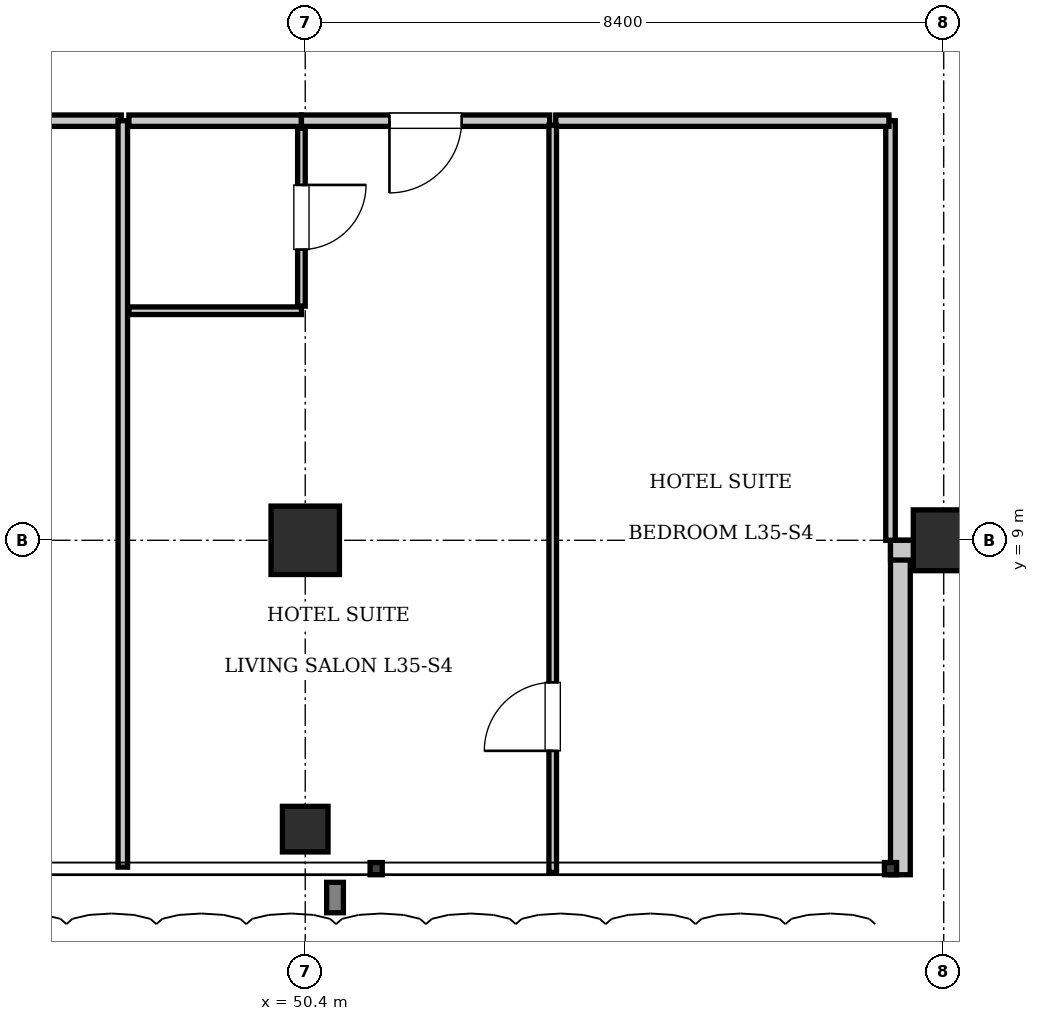
"""IFC4 building model, lengths in metres.
Left out: names, types, materials, properties, quantities, classifications, styles, units other than length and angle.
Written with IfcOpenShell. Run it as: python <this file> out.ifc"""

import sys

from ifc_helpers import new_model, si_unit, direction, frame, frame_2d, origin, origin_2d, place, context, subcontext, project, spatial, rectangle, i_section, extrude, element, fill, save


model = new_model("IFC4")
c1 = context("Model", 3, precision=1e-05, world=origin(), true_north=direction((0.0, 1.0)))
c2 = subcontext(c1, "Body", "Model", "MODEL_VIEW")
j1 = project(units=[si_unit("LENGTHUNIT", "METRE"), si_unit("PLANEANGLEUNIT", "RADIAN")], contexts=[c1])
p1 = place(None, origin())
s1 = spatial("IfcSite", under=j1, at=p1, CompositionType="ELEMENT")
p2 = place(p1, origin())
s2 = spatial("IfcBuilding", under=s1, at=p2, CompositionType="ELEMENT")
p3 = place(p2, frame((0.0, 0.0, 146.65)))
s3 = spatial("IfcBuildingStorey", under=s2, at=p3, CompositionType="ELEMENT", Elevation=146.65)
p4 = place(p3, frame((50.4, 9.0, 0.0), z_axis=(0.0, 0.0, 1.0), x_axis=(1.0, 0.0, 0.0)))
e1 = element("IfcColumn", 1, at=p4, inside=s3, PredefinedType="COLUMN", context=c2, shape_type="SweptSolid", body=[
    extrude(rectangle(XDim=0.9, YDim=0.9, at=origin_2d()), origin(), (0.0, 0.0, 1.0), 3.85),
])
p5 = place(p3, frame((58.8, 9.0, 0.0), z_axis=(0.0, 0.0, 1.0), x_axis=(1.0, 0.0, 0.0)))
e2 = element("IfcColumn", 2, at=p5, inside=s3, PredefinedType="COLUMN", context=c2, shape_type="SweptSolid", body=[
    extrude(rectangle(XDim=0.8, YDim=0.8, at=origin_2d()), origin(), (0.0, 0.0, 1.0), 3.85),
])
p6 = place(p3, frame((50.4, 5.2, 0.0), z_axis=(0.0, 0.0, 1.0), x_axis=(1.0, 0.0, 0.0)))
e3 = element("IfcColumn", 3, at=p6, inside=s3, PredefinedType="COLUMN", context=c2, shape_type="SweptSolid", body=[
    extrude(i_section(OverallWidth=0.6, OverallDepth=0.6, WebThickness=0.025, FlangeThickness=0.038, at=origin_2d()), origin(), (0.0, 0.0, 1.0), 3.85),
])
p7 = place(p3, frame((58.23, 9.0, 0.0), z_axis=(0.0, 0.0, 1.0), x_axis=(0.0, -1.0, 0.0)))
e4 = element("IfcWall", 4, at=p7, inside=s3, PredefinedType="SOLIDWALL", context=c2, shape_type="SweptSolid", body=[
    extrude(rectangle(XDim=4.4, YDim=0.26, at=frame_2d((2.2, 0.0))), origin(), (0.0, 0.0, 1.0), 3.61),
])
p8 = place(p3, frame((62.5, 8.87, 0.0), z_axis=(0.0, 0.0, 1.0), x_axis=(-1.0, 0.0, 0.0)))
e5 = element("IfcWall", 5, at=p8, inside=s3, PredefinedType="SOLIDWALL", context=c2, shape_type="SweptSolid", body=[
    extrude(rectangle(XDim=4.4, YDim=0.26, at=frame_2d((2.2, 0.0))), origin(), (0.0, 0.0, 1.0), 2.998),
])
p9 = place(p3, frame((58.1, 9.0, 0.0), z_axis=(0.0, 0.0, 1.0), x_axis=(0.0, 1.0, 0.0)))
e6 = element("IfcWall", 6, at=p9, inside=s3, PredefinedType="PARTITIONING", context=c2, shape_type="SweptSolid", body=[
    extrude(rectangle(XDim=5.52, YDim=0.125, at=frame_2d((2.76, 0.0))), origin(), (0.0, 0.0, 1.0), 3.61),
])
p10 = place(p3, frame((43.552, 14.52, 0.0), z_axis=(0.0, 0.0, 1.0), x_axis=(1.0, 0.0, 0.0)))
e7 = element("IfcWall", 7, at=p10, inside=s3, PredefinedType="PARTITIONING", context=c2, shape_type="SweptSolid", body=[
    extrude(rectangle(XDim=4.428, YDim=0.15, at=frame_2d((2.214, 0.0))), origin(), (0.0, 0.0, 1.0), 3.61),
])
p11 = place(p3, frame((48.0, 4.7, 0.0), z_axis=(0.0, 0.0, 1.0), x_axis=(0.0, 1.0, 0.0)))
e8 = element("IfcWall", 8, at=p11, inside=s3, PredefinedType="PARTITIONING", context=c2, shape_type="SweptSolid", body=[
    extrude(rectangle(XDim=9.82, YDim=0.125, at=frame_2d((4.91, 0.0))), origin(), (0.0, 0.0, 1.0), 3.61),
])
p12 = place(p3, frame((48.08, 14.52, 0.0), z_axis=(0.0, 0.0, 1.0), x_axis=(1.0, 0.0, 0.0)))
e9 = element("IfcWall", 9, at=p12, inside=s3, PredefinedType="PARTITIONING", context=c2, shape_type="SweptSolid", body=[
    extrude(rectangle(XDim=2.27, YDim=0.15, at=frame_2d((1.135, 0.0))), origin(), (0.0, 0.0, 1.0), 3.61),
])
p13 = place(p3, frame((48.08, 12.02, 0.0), z_axis=(0.0, 0.0, 1.0), x_axis=(1.0, 0.0, 0.0)))
e10 = element("IfcWall", 10, at=p13, inside=s3, PredefinedType="PARTITIONING", context=c2, shape_type="SweptSolid", body=[
    extrude(rectangle(XDim=2.27, YDim=0.1, at=frame_2d((1.135, 0.0))), origin(), (0.0, 0.0, 1.0), 3.61),
])
p14 = place(p3, frame((50.35, 12.08, 0.0), z_axis=(0.0, 0.0, 1.0), x_axis=(0.0, 1.0, 0.0)))
e11 = element("IfcWall", 11, at=p14, inside=s3, PredefinedType="PARTITIONING", context=c2, shape_type="SweptSolid", body=[
    extrude(rectangle(XDim=2.34, YDim=0.1, at=frame_2d((1.17, 0.0))), origin(), (0.0, 0.0, 1.0), 2.998),
])
p15 = place(p14, frame((0.745, 0.0, 0.0)))
e12 = element("IfcOpeningElement", 12, at=p15, cuts=e11, PredefinedType="OPENING", context=c2, shape_type="SweptSolid", body=[
    extrude(rectangle(XDim=0.85, YDim=2.1, at=frame_2d((0.425, 1.05))), frame((0.0, 0.06, 0.0), z_axis=(0.0, -1.0, 0.0), x_axis=(1.0, 0.0, 0.0)), (0.0, 0.0, 1.0), 0.12),
])
p16 = place(p3, frame((50.35, 14.52, 0.0), z_axis=(0.0, 0.0, 1.0), x_axis=(1.0, 0.0, 0.0)))
e13 = element("IfcWall", 13, at=p16, inside=s3, PredefinedType="PARTITIONING", context=c2, shape_type="SweptSolid", body=[
    extrude(rectangle(XDim=3.266, YDim=0.15, at=frame_2d((1.633, 0.0))), origin(), (0.0, 0.0, 1.0), 3.61),
])
p17 = place(p16, frame((1.158, 0.0, 0.0)))
e14 = element("IfcOpeningElement", 14, at=p17, cuts=e13, PredefinedType="OPENING", context=c2, shape_type="SweptSolid", body=[
    extrude(rectangle(XDim=0.95, YDim=2.15, at=frame_2d((0.475, 1.075))), frame((0.0, 0.085, 0.0), z_axis=(0.0, -1.0, 0.0), x_axis=(1.0, 0.0, 0.0)), (0.0, 0.0, 1.0), 0.17),
])
p18 = place(p3, frame((53.696, 14.52, 0.0), z_axis=(0.0, 0.0, 1.0), x_axis=(1.0, 0.0, 0.0)))
e15 = element("IfcWall", 15, at=p18, inside=s3, PredefinedType="PARTITIONING", context=c2, shape_type="SweptSolid", body=[
    extrude(rectangle(XDim=4.384, YDim=0.15, at=frame_2d((2.192, 0.0))), origin(), (0.0, 0.0, 1.0), 3.61),
])
p19 = place(p3, frame((53.656, 4.63, 0.0), z_axis=(0.0, 0.0, 1.0), x_axis=(0.0, 1.0, 0.0)))
e16 = element("IfcWall", 16, at=p19, inside=s3, PredefinedType="PARTITIONING", context=c2, shape_type="SweptSolid", body=[
    extrude(rectangle(XDim=9.83, YDim=0.1, at=frame_2d((4.915, 0.0))), origin(), (0.0, 0.0, 1.0), 3.61),
])
p20 = place(p19, frame((1.6, 0.0, 0.0)))
e17 = element("IfcOpeningElement", 17, at=p20, cuts=e16, PredefinedType="OPENING", context=c2, shape_type="SweptSolid", body=[
    extrude(rectangle(XDim=0.9, YDim=2.1, at=frame_2d((0.45, 1.05))), frame((0.0, 0.06, 0.0), z_axis=(0.0, -1.0, 0.0), x_axis=(1.0, 0.0, 0.0)), (0.0, 0.0, 1.0), 0.12),
])
p21 = place(p15, frame((0.85, 0.0, 0.0), z_axis=(0.0, 0.0, 1.0), x_axis=(-1.0, 0.0, 0.0)))
e18 = element("IfcDoor", 18, at=p21, inside=s3, OperationType="SINGLE_SWING_LEFT", PredefinedType="DOOR", context=c2, shape_type="SweptSolid", body=[
    extrude(rectangle(XDim=0.85, YDim=2.1, at=frame_2d((0.425, 1.05))), frame((0.0, 0.025, 0.0), z_axis=(0.0, -1.0, 0.0), x_axis=(1.0, 0.0, 0.0)), (0.0, 0.0, 1.0), 0.05),
])
fill(e12, e18)
p22 = place(p17, frame((0.95, 0.0, 0.0), z_axis=(0.0, 0.0, 1.0), x_axis=(-1.0, 0.0, 0.0)))
e19 = element("IfcDoor", 19, at=p22, inside=s3, OperationType="SINGLE_SWING_RIGHT", PredefinedType="DOOR", context=c2, shape_type="SweptSolid", body=[
    extrude(rectangle(XDim=0.95, YDim=2.15, at=frame_2d((0.475, 1.075))), frame((0.0, 0.025, 0.0), z_axis=(0.0, -1.0, 0.0), x_axis=(1.0, 0.0, 0.0)), (0.0, 0.0, 1.0), 0.05),
])
fill(e14, e19)
p23 = place(p20, origin())
e20 = element("IfcDoor", 20, at=p23, inside=s3, OperationType="SINGLE_SWING_LEFT", PredefinedType="DOOR", context=c2, shape_type="SweptSolid", body=[
    extrude(rectangle(XDim=0.9, YDim=2.1, at=frame_2d((0.45, 1.05))), frame((0.0, 0.025, 0.0), z_axis=(0.0, -1.0, 0.0), x_axis=(1.0, 0.0, 0.0)), (0.0, 0.0, 1.0), 0.05),
])
fill(e17, e20)
save(model, sys.argv[1])
